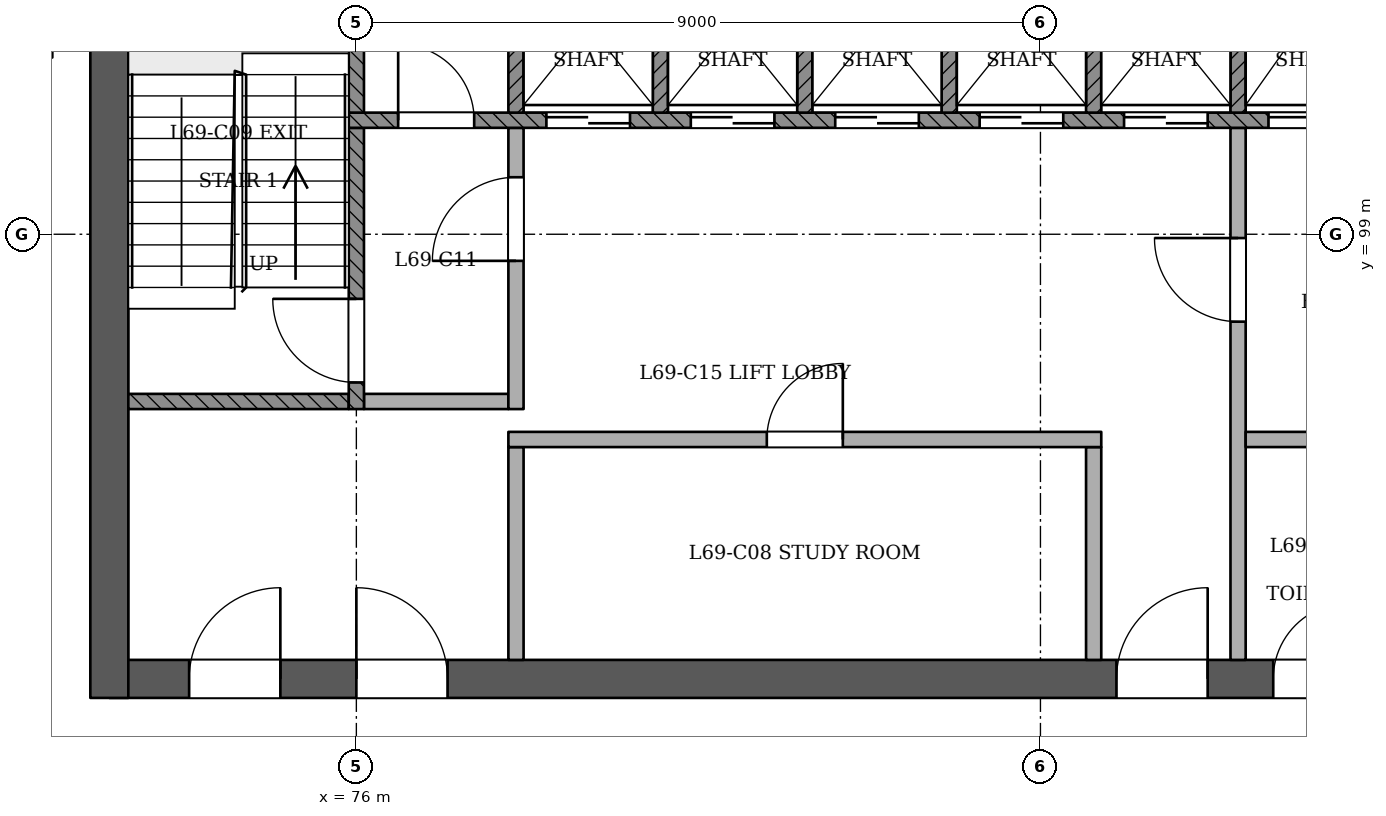
"""IFC4 building model, lengths in metres.
Left out: names, types, materials, properties, quantities, classifications, styles, units other than length and angle.
Written with IfcOpenShell. Run it as: python <this file> out.ifc"""

import sys

from ifc_helpers import new_model, si_unit, direction, frame, frame_2d, origin, place, context, subcontext, project, spatial, rectangle, extrude, element, fill, save


model = new_model("IFC4")
c1 = context("Model", 3, precision=1e-05, world=origin(), true_north=direction((0.0, 1.0)))
c2 = subcontext(c1, "Body", "Model", "MODEL_VIEW")
j1 = project(units=[si_unit("LENGTHUNIT", "METRE"), si_unit("PLANEANGLEUNIT", "RADIAN")], contexts=[c1])
p1 = place(None, origin())
s1 = spatial("IfcSite", under=j1, at=p1, CompositionType="ELEMENT")
p2 = place(p1, origin())
s2 = spatial("IfcBuilding", under=s1, at=p2, CompositionType="ELEMENT")
p3 = place(p2, frame((0.0, 0.0, 268.0)))
s3 = spatial("IfcBuildingStorey", under=s2, at=p3, CompositionType="ELEMENT", Elevation=268.0)
p4 = place(p3, frame((72.75, 93.15, 0.0), z_axis=(0.0, 0.0, 1.0), x_axis=(1.0, 0.0, 0.0)))
e1 = element("IfcWall", 1, at=p4, inside=s3, PredefinedType="SHEAR", context=c2, shape_type="SweptSolid", body=[
    extrude(rectangle(XDim=24.75, YDim=0.5, at=frame_2d((12.375, 0.0))), origin(), (0.0, 0.0, 1.0), 3.6),
])
p5 = place(p4, frame((1.05, 0.0, 0.0)))
e2 = element("IfcOpeningElement", 2, at=p5, cuts=e1, PredefinedType="OPENING", context=c2, shape_type="SweptSolid", body=[
    extrude(rectangle(XDim=1.2, YDim=2.1, at=frame_2d((0.6, 1.05))), frame((0.0, 0.26, 0.0), z_axis=(0.0, -1.0, 0.0), x_axis=(1.0, 0.0, 0.0)), (0.0, 0.0, 1.0), 0.521),
])
p6 = place(p4, frame((3.25, 0.0, 0.0)))
e3 = element("IfcOpeningElement", 3, at=p6, cuts=e1, PredefinedType="OPENING", context=c2, shape_type="SweptSolid", body=[
    extrude(rectangle(XDim=1.2, YDim=2.1, at=frame_2d((0.6, 1.05))), frame((0.0, 0.26, 0.0), z_axis=(0.0, -1.0, 0.0), x_axis=(1.0, 0.0, 0.0)), (0.0, 0.0, 1.0), 0.521),
])
p7 = place(p4, frame((13.25, 0.0, 0.0)))
e4 = element("IfcOpeningElement", 4, at=p7, cuts=e1, PredefinedType="OPENING", context=c2, shape_type="SweptSolid", body=[
    extrude(rectangle(XDim=1.2, YDim=2.1, at=frame_2d((0.6, 1.05))), frame((0.0, 0.26, 0.0), z_axis=(0.0, -1.0, 0.0), x_axis=(1.0, 0.0, 0.0)), (0.0, 0.0, 1.0), 0.521),
])
p8 = place(p4, frame((15.312, 0.0, 0.0)))
e5 = element("IfcOpeningElement", 5, at=p8, cuts=e1, PredefinedType="OPENING", context=c2, shape_type="SweptSolid", body=[
    extrude(rectangle(XDim=1.0, YDim=2.1, at=frame_2d((0.5, 1.05))), frame((0.0, 0.26, 0.0), z_axis=(0.0, -1.0, 0.0), x_axis=(1.0, 0.0, 0.0)), (0.0, 0.0, 1.0), 0.521),
])
p9 = place(p4, frame((17.55, 0.0, 0.0)))
e6 = element("IfcOpeningElement", 6, at=p9, cuts=e1, PredefinedType="OPENING", context=c2, shape_type="SweptSolid", body=[
    extrude(rectangle(XDim=1.0, YDim=2.1, at=frame_2d((0.5, 1.05))), frame((0.0, 0.26, 0.0), z_axis=(0.0, -1.0, 0.0), x_axis=(1.0, 0.0, 0.0)), (0.0, 0.0, 1.0), 0.521),
])
p10 = place(p4, frame((20.1, 0.0, 0.0)))
e7 = element("IfcOpeningElement", 7, at=p10, cuts=e1, PredefinedType="OPENING", context=c2, shape_type="SweptSolid", body=[
    extrude(rectangle(XDim=1.0, YDim=2.1, at=frame_2d((0.5, 1.05))), frame((0.0, 0.26, 0.0), z_axis=(0.0, -1.0, 0.0), x_axis=(1.0, 0.0, 0.0)), (0.0, 0.0, 1.0), 0.521),
])
p11 = place(p4, frame((22.587, 0.0, 0.0)))
e8 = element("IfcOpeningElement", 8, at=p11, cuts=e1, PredefinedType="OPENING", context=c2, shape_type="SweptSolid", body=[
    extrude(rectangle(XDim=1.0, YDim=2.1, at=frame_2d((0.5, 1.05))), frame((0.0, 0.26, 0.0), z_axis=(0.0, -1.0, 0.0), x_axis=(1.0, 0.0, 0.0)), (0.0, 0.0, 1.0), 0.521),
])
p12 = place(p3, frame((72.75, 103.65, 0.0), z_axis=(0.0, 0.0, 1.0), x_axis=(0.0, -1.0, 0.0)))
e9 = element("IfcWall", 9, at=p12, inside=s3, PredefinedType="SHEAR", context=c2, shape_type="SweptSolid", body=[
    extrude(rectangle(XDim=10.75, YDim=0.5, at=frame_2d((5.375, 0.0))), origin(), (0.0, 0.0, 1.0), 3.6),
])
p13 = place(p3, frame((72.0, 101.4, 0.0), z_axis=(0.0, 0.0, 1.0), x_axis=(-1.0, 0.0, 0.0)))
e10 = element("IfcWall", 10, at=p13, inside=s3, PredefinedType="PARTITIONING", context=c2, shape_type="SweptSolid", body=[
    extrude(rectangle(XDim=1.8, YDim=0.15, at=frame_2d((0.9, 0.0))), origin(), (0.0, 0.0, 1.0), 3.2),
])
for number, where, z_axis, x_axis in (
    (11, (78.1, 93.4, 0.0), (0.0, 0.0, 1.0), (0.0, 1.0, 0.0)),
    (12, (85.7, 93.4, 0.0), (0.0, 0.0, 1.0), (0.0, 1.0, 0.0)),
):
    element("IfcWall", number, at=place(p3, frame(where, z_axis=z_axis, x_axis=x_axis)), inside=s3, PredefinedType="PARTITIONING", context=c2, shape_type="SweptSolid", body=[
        extrude(rectangle(XDim=2.8, YDim=0.2, at=frame_2d((1.4, 0.0))), origin(), (0.0, 0.0, 1.0), 3.2),
    ])
p14 = place(p3, frame((87.6, 93.4, 0.0), z_axis=(0.0, 0.0, 1.0), x_axis=(0.0, 1.0, 0.0)))
e13 = element("IfcWall", 13, at=p14, inside=s3, PredefinedType="PARTITIONING", context=c2, shape_type="SweptSolid", body=[
    extrude(rectangle(XDim=7.0, YDim=0.2, at=frame_2d((3.5, 0.0))), origin(), (0.0, 0.0, 1.0), 3.2),
])
p15 = place(p14, frame((4.45, 0.0, 0.0)))
e14 = element("IfcOpeningElement", 14, at=p15, cuts=e13, PredefinedType="OPENING", context=c2, shape_type="SweptSolid", body=[
    extrude(rectangle(XDim=1.1, YDim=2.1, at=frame_2d((0.55, 1.05))), frame((0.0, 0.11, 0.0), z_axis=(0.0, -1.0, 0.0), x_axis=(1.0, 0.0, 0.0)), (0.0, 0.0, 1.0), 0.221),
])
p16 = place(p3, frame((78.0, 96.3, 0.0), z_axis=(0.0, 0.0, 1.0), x_axis=(1.0, 0.0, 0.0)))
e15 = element("IfcWall", 15, at=p16, inside=s3, PredefinedType="PARTITIONING", context=c2, shape_type="SweptSolid", body=[
    extrude(rectangle(XDim=7.8, YDim=0.2, at=frame_2d((3.9, 0.0))), origin(), (0.0, 0.0, 1.0), 3.2),
])
p17 = place(p16, frame((3.4, 0.0, 0.0)))
e16 = element("IfcOpeningElement", 16, at=p17, cuts=e15, PredefinedType="OPENING", context=c2, shape_type="SweptSolid", body=[
    extrude(rectangle(XDim=1.0, YDim=2.1, at=frame_2d((0.5, 1.05))), frame((0.0, 0.11, 0.0), z_axis=(0.0, -1.0, 0.0), x_axis=(1.0, 0.0, 0.0)), (0.0, 0.0, 1.0), 0.221),
])
p18 = place(p3, frame((87.7, 96.3, 0.0), z_axis=(0.0, 0.0, 1.0), x_axis=(1.0, 0.0, 0.0)))
e17 = element("IfcWall", 17, at=p18, inside=s3, PredefinedType="PARTITIONING", context=c2, shape_type="SweptSolid", body=[
    extrude(rectangle(XDim=3.6, YDim=0.2, at=frame_2d((1.8, 0.0))), origin(), (0.0, 0.0, 1.0), 3.2),
])
p19 = place(p3, frame((73.0, 96.8, 0.0), z_axis=(0.0, 0.0, 1.0), x_axis=(1.0, 0.0, 0.0)))
e18 = element("IfcWall", 18, at=p19, inside=s3, PredefinedType="SOLIDWALL", context=c2, shape_type="SweptSolid", body=[
    extrude(rectangle(XDim=2.9, YDim=0.2, at=frame_2d((1.45, 0.0))), origin(), (0.0, 0.0, 1.0), 3.2),
])
p20 = place(p3, frame((76.0, 96.7, 0.0), z_axis=(0.0, 0.0, 1.0), x_axis=(0.0, 1.0, 0.0)))
e19 = element("IfcWall", 19, at=p20, inside=s3, PredefinedType="SOLIDWALL", context=c2, shape_type="SweptSolid", body=[
    extrude(rectangle(XDim=3.7, YDim=0.2, at=frame_2d((1.85, 0.0))), origin(), (0.0, 0.0, 1.0), 3.2),
])
p21 = place(p20, frame((0.35, 0.0, 0.0)))
e20 = element("IfcOpeningElement", 20, at=p21, cuts=e19, PredefinedType="OPENING", context=c2, shape_type="SweptSolid", body=[
    extrude(rectangle(XDim=1.1, YDim=2.1, at=frame_2d((0.55, 1.05))), frame((0.0, 0.11, 0.0), z_axis=(0.0, -1.0, 0.0), x_axis=(1.0, 0.0, 0.0)), (0.0, 0.0, 1.0), 0.221),
])
p22 = place(p3, frame((76.1, 96.8, 0.0), z_axis=(0.0, 0.0, 1.0), x_axis=(1.0, 0.0, 0.0)))
e21 = element("IfcWall", 21, at=p22, inside=s3, PredefinedType="PARTITIONING", context=c2, shape_type="SweptSolid", body=[
    extrude(rectangle(XDim=1.9, YDim=0.2, at=frame_2d((0.95, 0.0))), origin(), (0.0, 0.0, 1.0), 3.2),
])
p23 = place(p3, frame((78.1, 96.7, 0.0), z_axis=(0.0, 0.0, 1.0), x_axis=(0.0, 1.0, 0.0)))
e22 = element("IfcWall", 22, at=p23, inside=s3, PredefinedType="PARTITIONING", context=c2, shape_type="SweptSolid", body=[
    extrude(rectangle(XDim=3.7, YDim=0.2, at=frame_2d((1.85, 0.0))), origin(), (0.0, 0.0, 1.0), 3.2),
])
p24 = place(p23, frame((1.95, 0.0, 0.0)))
e23 = element("IfcOpeningElement", 23, at=p24, cuts=e22, PredefinedType="OPENING", context=c2, shape_type="SweptSolid", body=[
    extrude(rectangle(XDim=1.1, YDim=2.1, at=frame_2d((0.55, 1.05))), frame((0.0, 0.11, 0.0), z_axis=(0.0, -1.0, 0.0), x_axis=(1.0, 0.0, 0.0)), (0.0, 0.0, 1.0), 0.221),
])
p25 = place(p3, frame((75.9, 100.5, 0.0), z_axis=(0.0, 0.0, 1.0), x_axis=(1.0, 0.0, 0.0)))
e24 = element("IfcWall", 24, at=p25, inside=s3, PredefinedType="SOLIDWALL", context=c2, shape_type="SweptSolid", body=[
    extrude(rectangle(XDim=18.2, YDim=0.2, at=frame_2d((9.1, 0.0))), origin(), (0.0, 0.0, 1.0), 3.2),
])
p26 = place(p25, frame((2.6, 0.0, 0.0)))
e25 = element("IfcOpeningElement", 25, at=p26, cuts=e24, PredefinedType="OPENING", context=c2, shape_type="SweptSolid", body=[
    extrude(rectangle(XDim=1.1, YDim=2.1, at=frame_2d((0.55, 1.05))), frame((0.0, 0.11, 0.0), z_axis=(0.0, -1.0, 0.0), x_axis=(1.0, 0.0, 0.0)), (0.0, 0.0, 1.0), 0.221),
])
p27 = place(p25, frame((4.5, 0.0, 0.0)))
e26 = element("IfcOpeningElement", 26, at=p27, cuts=e24, PredefinedType="OPENING", context=c2, shape_type="SweptSolid", body=[
    extrude(rectangle(XDim=1.1, YDim=2.1, at=frame_2d((0.55, 1.05))), frame((0.0, 0.11, 0.0), z_axis=(0.0, -1.0, 0.0), x_axis=(1.0, 0.0, 0.0)), (0.0, 0.0, 1.0), 0.221),
])
p28 = place(p25, frame((6.4, 0.0, 0.0)))
e27 = element("IfcOpeningElement", 27, at=p28, cuts=e24, PredefinedType="OPENING", context=c2, shape_type="SweptSolid", body=[
    extrude(rectangle(XDim=1.1, YDim=2.1, at=frame_2d((0.55, 1.05))), frame((0.0, 0.11, 0.0), z_axis=(0.0, -1.0, 0.0), x_axis=(1.0, 0.0, 0.0)), (0.0, 0.0, 1.0), 0.221),
])
p29 = place(p25, frame((8.3, 0.0, 0.0)))
e28 = element("IfcOpeningElement", 28, at=p29, cuts=e24, PredefinedType="OPENING", context=c2, shape_type="SweptSolid", body=[
    extrude(rectangle(XDim=1.1, YDim=2.1, at=frame_2d((0.55, 1.05))), frame((0.0, 0.11, 0.0), z_axis=(0.0, -1.0, 0.0), x_axis=(1.0, 0.0, 0.0)), (0.0, 0.0, 1.0), 0.221),
])
p30 = place(p25, frame((10.2, 0.0, 0.0)))
e29 = element("IfcOpeningElement", 29, at=p30, cuts=e24, PredefinedType="OPENING", context=c2, shape_type="SweptSolid", body=[
    extrude(rectangle(XDim=1.1, YDim=2.1, at=frame_2d((0.55, 1.05))), frame((0.0, 0.11, 0.0), z_axis=(0.0, -1.0, 0.0), x_axis=(1.0, 0.0, 0.0)), (0.0, 0.0, 1.0), 0.221),
])
p31 = place(p25, frame((12.1, 0.0, 0.0)))
e30 = element("IfcOpeningElement", 30, at=p31, cuts=e24, PredefinedType="OPENING", context=c2, shape_type="SweptSolid", body=[
    extrude(rectangle(XDim=1.1, YDim=2.1, at=frame_2d((0.55, 1.05))), frame((0.0, 0.11, 0.0), z_axis=(0.0, -1.0, 0.0), x_axis=(1.0, 0.0, 0.0)), (0.0, 0.0, 1.0), 0.221),
])
p32 = place(p25, frame((14.0, 0.0, 0.0)))
e31 = element("IfcOpeningElement", 31, at=p32, cuts=e24, PredefinedType="OPENING", context=c2, shape_type="SweptSolid", body=[
    extrude(rectangle(XDim=1.1, YDim=2.1, at=frame_2d((0.55, 1.05))), frame((0.0, 0.11, 0.0), z_axis=(0.0, -1.0, 0.0), x_axis=(1.0, 0.0, 0.0)), (0.0, 0.0, 1.0), 0.221),
])
p33 = place(p25, frame((0.65, 0.0, 0.0)))
e32 = element("IfcOpeningElement", 32, at=p33, cuts=e24, PredefinedType="OPENING", context=c2, shape_type="SweptSolid", body=[
    extrude(rectangle(XDim=1.0, YDim=2.1, at=frame_2d((0.5, 1.05))), frame((0.0, 0.11, 0.0), z_axis=(0.0, -1.0, 0.0), x_axis=(1.0, 0.0, 0.0)), (0.0, 0.0, 1.0), 0.221),
])
p34 = place(p25, frame((16.3, 0.0, 0.0)))
e33 = element("IfcOpeningElement", 33, at=p34, cuts=e24, PredefinedType="OPENING", context=c2, shape_type="SweptSolid", body=[
    extrude(rectangle(XDim=1.0, YDim=2.1, at=frame_2d((0.5, 1.05))), frame((0.0, 0.11, 0.0), z_axis=(0.0, -1.0, 0.0), x_axis=(1.0, 0.0, 0.0)), (0.0, 0.0, 1.0), 0.221),
])
for number, where, z_axis, x_axis in (
    (34, (76.0, 100.6, 0.0), (0.0, 0.0, 1.0), (0.0, 1.0, 0.0)),
    (35, (78.1, 100.6, 0.0), (0.0, 0.0, 1.0), (0.0, 1.0, 0.0)),
    (36, (80.0, 100.6, 0.0), (0.0, 0.0, 1.0), (0.0, 1.0, 0.0)),
    (37, (81.9, 100.6, 0.0), (0.0, 0.0, 1.0), (0.0, 1.0, 0.0)),
    (38, (83.8, 100.6, 0.0), (0.0, 0.0, 1.0), (0.0, 1.0, 0.0)),
    (39, (85.7, 100.6, 0.0), (0.0, 0.0, 1.0), (0.0, 1.0, 0.0)),
    (40, (87.6, 100.6, 0.0), (0.0, 0.0, 1.0), (0.0, 1.0, 0.0)),
):
    element("IfcWall", number, at=place(p3, frame(where, z_axis=z_axis, x_axis=x_axis)), inside=s3, PredefinedType="SOLIDWALL", context=c2, shape_type="SweptSolid", body=[
        extrude(rectangle(XDim=2.8, YDim=0.2, at=frame_2d((1.4, 0.0))), origin(), (0.0, 0.0, 1.0), 3.2),
    ])
p35 = place(p26, origin())
e41 = element("IfcDoor", 41, at=p35, inside=s3, OperationType="SLIDING_TO_RIGHT", PredefinedType="NOTDEFINED", context=c2, shape_type="SweptSolid", body=[
    extrude(rectangle(XDim=1.1, YDim=2.1, at=frame_2d((0.55, 1.05))), frame((0.0, 0.025, 0.0), z_axis=(0.0, -1.0, 0.0), x_axis=(1.0, 0.0, 0.0)), (0.0, 0.0, 1.0), 0.05),
])
fill(e25, e41)
p36 = place(p27, origin())
e42 = element("IfcDoor", 42, at=p36, inside=s3, OperationType="SLIDING_TO_LEFT", PredefinedType="NOTDEFINED", context=c2, shape_type="SweptSolid", body=[
    extrude(rectangle(XDim=1.1, YDim=2.1, at=frame_2d((0.55, 1.05))), frame((0.0, 0.025, 0.0), z_axis=(0.0, -1.0, 0.0), x_axis=(1.0, 0.0, 0.0)), (0.0, 0.0, 1.0), 0.05),
])
fill(e26, e42)
p37 = place(p28, origin())
e43 = element("IfcDoor", 43, at=p37, inside=s3, OperationType="SLIDING_TO_RIGHT", PredefinedType="NOTDEFINED", context=c2, shape_type="SweptSolid", body=[
    extrude(rectangle(XDim=1.1, YDim=2.1, at=frame_2d((0.55, 1.05))), frame((0.0, 0.025, 0.0), z_axis=(0.0, -1.0, 0.0), x_axis=(1.0, 0.0, 0.0)), (0.0, 0.0, 1.0), 0.05),
])
fill(e27, e43)
p38 = place(p29, origin())
e44 = element("IfcDoor", 44, at=p38, inside=s3, OperationType="SLIDING_TO_LEFT", PredefinedType="NOTDEFINED", context=c2, shape_type="SweptSolid", body=[
    extrude(rectangle(XDim=1.1, YDim=2.1, at=frame_2d((0.55, 1.05))), frame((0.0, 0.025, 0.0), z_axis=(0.0, -1.0, 0.0), x_axis=(1.0, 0.0, 0.0)), (0.0, 0.0, 1.0), 0.05),
])
fill(e28, e44)
p39 = place(p30, origin())
e45 = element("IfcDoor", 45, at=p39, inside=s3, OperationType="SLIDING_TO_RIGHT", PredefinedType="NOTDEFINED", context=c2, shape_type="SweptSolid", body=[
    extrude(rectangle(XDim=1.1, YDim=2.1, at=frame_2d((0.55, 1.05))), frame((0.0, 0.025, 0.0), z_axis=(0.0, -1.0, 0.0), x_axis=(1.0, 0.0, 0.0)), (0.0, 0.0, 1.0), 0.05),
])
fill(e29, e45)
p40 = place(p31, origin())
e46 = element("IfcDoor", 46, at=p40, inside=s3, OperationType="SLIDING_TO_RIGHT", PredefinedType="NOTDEFINED", context=c2, shape_type="SweptSolid", body=[
    extrude(rectangle(XDim=1.1, YDim=2.1, at=frame_2d((0.55, 1.05))), frame((0.0, 0.025, 0.0), z_axis=(0.0, -1.0, 0.0), x_axis=(1.0, 0.0, 0.0)), (0.0, 0.0, 1.0), 0.05),
])
fill(e30, e46)
p41 = place(p21, origin())
e47 = element("IfcDoor", 47, at=p41, inside=s3, OperationType="SINGLE_SWING_RIGHT", PredefinedType="NOTDEFINED", context=c2, shape_type="SweptSolid", body=[
    extrude(rectangle(XDim=1.1, YDim=2.1, at=frame_2d((0.55, 1.05))), frame((0.0, 0.025, 0.0), z_axis=(0.0, -1.0, 0.0), x_axis=(1.0, 0.0, 0.0)), (0.0, 0.0, 1.0), 0.05),
])
fill(e20, e47)
p42 = place(p24, origin())
e48 = element("IfcDoor", 48, at=p42, inside=s3, OperationType="SINGLE_SWING_LEFT", PredefinedType="NOTDEFINED", context=c2, shape_type="SweptSolid", body=[
    extrude(rectangle(XDim=1.1, YDim=2.1, at=frame_2d((0.55, 1.05))), frame((0.0, 0.025, 0.0), z_axis=(0.0, -1.0, 0.0), x_axis=(1.0, 0.0, 0.0)), (0.0, 0.0, 1.0), 0.05),
])
fill(e23, e48)
p43 = place(p15, origin())
e49 = element("IfcDoor", 49, at=p43, inside=s3, OperationType="SINGLE_SWING_RIGHT", PredefinedType="NOTDEFINED", context=c2, shape_type="SweptSolid", body=[
    extrude(rectangle(XDim=1.1, YDim=2.1, at=frame_2d((0.55, 1.05))), frame((0.0, 0.025, 0.0), z_axis=(0.0, -1.0, 0.0), x_axis=(1.0, 0.0, 0.0)), (0.0, 0.0, 1.0), 0.05),
])
fill(e14, e49)
p44 = place(p5, origin())
e50 = element("IfcDoor", 50, at=p44, inside=s3, OperationType="SINGLE_SWING_RIGHT", PredefinedType="NOTDEFINED", context=c2, shape_type="SweptSolid", body=[
    extrude(rectangle(XDim=1.2, YDim=2.1, at=frame_2d((0.6, 1.05))), frame((0.0, 0.025, 0.0), z_axis=(0.0, -1.0, 0.0), x_axis=(1.0, 0.0, 0.0)), (0.0, 0.0, 1.0), 0.05),
])
fill(e2, e50)
p45 = place(p6, origin())
e51 = element("IfcDoor", 51, at=p45, inside=s3, OperationType="SINGLE_SWING_LEFT", PredefinedType="NOTDEFINED", context=c2, shape_type="SweptSolid", body=[
    extrude(rectangle(XDim=1.2, YDim=2.1, at=frame_2d((0.6, 1.05))), frame((0.0, 0.025, 0.0), z_axis=(0.0, -1.0, 0.0), x_axis=(1.0, 0.0, 0.0)), (0.0, 0.0, 1.0), 0.05),
])
fill(e3, e51)
p46 = place(p7, origin())
e52 = element("IfcDoor", 52, at=p46, inside=s3, OperationType="SINGLE_SWING_RIGHT", PredefinedType="NOTDEFINED", context=c2, shape_type="SweptSolid", body=[
    extrude(rectangle(XDim=1.2, YDim=2.1, at=frame_2d((0.6, 1.05))), frame((0.0, 0.025, 0.0), z_axis=(0.0, -1.0, 0.0), x_axis=(1.0, 0.0, 0.0)), (0.0, 0.0, 1.0), 0.05),
])
fill(e4, e52)
p47 = place(p33, origin())
e53 = element("IfcDoor", 53, at=p47, inside=s3, OperationType="SINGLE_SWING_LEFT", PredefinedType="NOTDEFINED", context=c2, shape_type="SweptSolid", body=[
    extrude(rectangle(XDim=1.0, YDim=2.1, at=frame_2d((0.5, 1.05))), frame((0.0, 0.025, 0.0), z_axis=(0.0, -1.0, 0.0), x_axis=(1.0, 0.0, 0.0)), (0.0, 0.0, 1.0), 0.05),
])
fill(e32, e53)
p48 = place(p8, origin())
e54 = element("IfcDoor", 54, at=p48, inside=s3, OperationType="SINGLE_SWING_RIGHT", PredefinedType="NOTDEFINED", context=c2, shape_type="SweptSolid", body=[
    extrude(rectangle(XDim=1.0, YDim=2.1, at=frame_2d((0.5, 1.05))), frame((0.0, 0.025, 0.0), z_axis=(0.0, -1.0, 0.0), x_axis=(1.0, 0.0, 0.0)), (0.0, 0.0, 1.0), 0.05),
])
fill(e5, e54)
p49 = place(p17, origin())
e55 = element("IfcDoor", 55, at=p49, inside=s3, OperationType="SINGLE_SWING_RIGHT", PredefinedType="NOTDEFINED", context=c2, shape_type="SweptSolid", body=[
    extrude(rectangle(XDim=1.0, YDim=2.1, at=frame_2d((0.5, 1.05))), frame((0.0, 0.025, 0.0), z_axis=(0.0, -1.0, 0.0), x_axis=(1.0, 0.0, 0.0)), (0.0, 0.0, 1.0), 0.05),
])
fill(e16, e55)
save(model, sys.argv[1])
